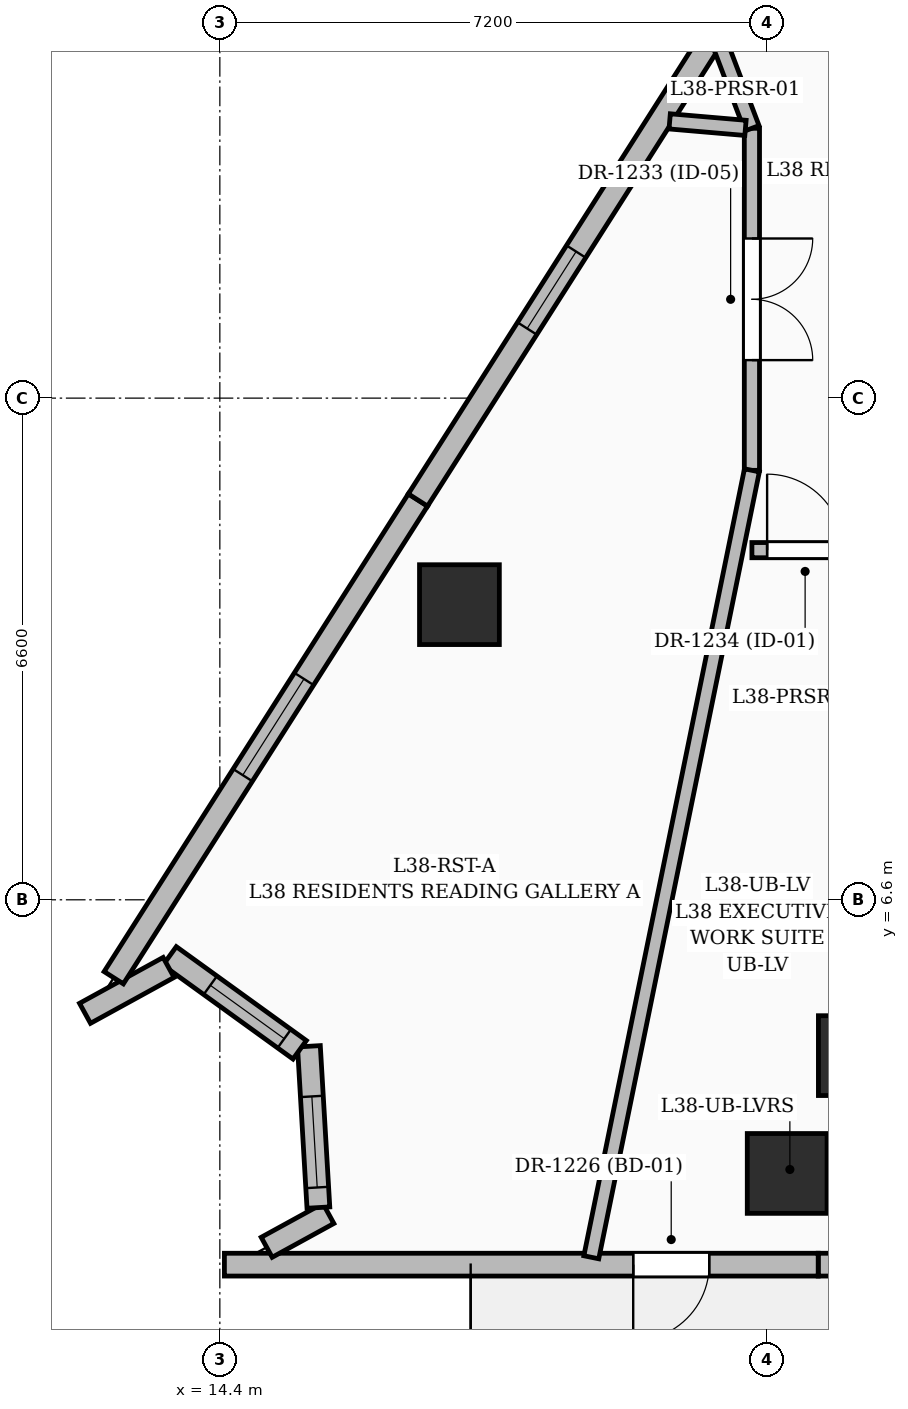
"""IFC4 building model, lengths in metres.
Left out: names, types, materials, properties, quantities, classifications, styles, units other than length and angle.
Written with IfcOpenShell. Run it as: python <this file> out.ifc"""

import sys

from ifc_helpers import new_model, si_unit, direction, frame, frame_2d, origin, origin_2d, place, context, subcontext, project, spatial, rectangle, extrude, element, fill, save


model = new_model("IFC4")
c1 = context("Model", 3, precision=1e-05, world=origin(), true_north=direction((0.0, 1.0)))
c2 = subcontext(c1, "Body", "Model", "MODEL_VIEW")
j1 = project(units=[si_unit("LENGTHUNIT", "METRE"), si_unit("PLANEANGLEUNIT", "RADIAN")], contexts=[c1])
p1 = place(None, origin())
s1 = spatial("IfcSite", under=j1, at=p1, CompositionType="ELEMENT")
p2 = place(p1, origin())
s2 = spatial("IfcBuilding", under=s1, at=p2, CompositionType="ELEMENT")
p3 = place(p2, frame((0.0, 0.0, 150.0)))
s3 = spatial("IfcBuildingStorey", under=s2, at=p3, CompositionType="ELEMENT", Elevation=150.0)
for number, where, z_axis, x_axis in (
    (1, (22.8, 4.55, 0.0), (0.0, 0.0, 1.0), (1.0, 0.0, 0.0)),
    (2, (21.864, 3.0, 0.0), (0.0, 0.0, 1.0), (1.0, 0.0, 0.0)),
    (3, (17.552, 10.483, 0.0), (0.0, 0.0, 1.0), (1.0, 0.0, 0.0)),
):
    element("IfcColumn", number, at=place(p3, frame(where, z_axis=z_axis, x_axis=x_axis)), inside=s3, PredefinedType="COLUMN", context=c2, shape_type="SweptSolid", body=[
        extrude(rectangle(XDim=1.05, YDim=1.05, at=origin_2d()), origin(), (0.0, 0.0, 1.0), 3.6),
    ])
p4 = place(p3, frame((30.084, 1.8, 0.0), z_axis=(0.0, 0.0, 1.0), x_axis=(-1.0, 0.0, 0.0)))
e4 = element("IfcWall", 4, at=p4, inside=s3, PredefinedType="SOLIDWALL", context=c2, shape_type="SweptSolid", body=[
    extrude(rectangle(XDim=7.812, YDim=0.3, at=frame_2d((3.906, 0.0))), origin(), (0.0, 0.0, 1.0), 3.35),
])
p5 = place(p4, frame((4.525, 0.0, 0.6)))
e5 = element("IfcOpeningElement", 5, at=p5, cuts=e4, PredefinedType="OPENING", context=c2, shape_type="SweptSolid", body=[
    extrude(rectangle(XDim=1.5, YDim=2.1, at=frame_2d((0.75, 1.05))), frame((0.0, 0.16, 0.0), z_axis=(0.0, -1.0, 0.0), x_axis=(1.0, 0.0, 0.0)), (0.0, 0.0, 1.0), 0.32),
])
p6 = place(p4, frame((1.025, 0.0, 0.6)))
e6 = element("IfcOpeningElement", 6, at=p6, cuts=e4, PredefinedType="OPENING", context=c2, shape_type="SweptSolid", body=[
    extrude(rectangle(XDim=1.5, YDim=2.1, at=frame_2d((0.75, 1.05))), frame((0.0, 0.16, 0.0), z_axis=(0.0, -1.0, 0.0), x_axis=(1.0, 0.0, 0.0)), (0.0, 0.0, 1.0), 0.32),
])
p7 = place(p3, frame((22.272, 1.8, 0.0), z_axis=(0.0, 0.0, 1.0), x_axis=(-1.0, 0.0, 0.0)))
e7 = element("IfcWall", 7, at=p7, inside=s3, PredefinedType="SOLIDWALL", context=c2, shape_type="SweptSolid", body=[
    extrude(rectangle(XDim=7.812, YDim=0.3, at=frame_2d((3.906, 0.0))), origin(), (0.0, 0.0, 1.0), 3.35),
])
p8 = place(p7, frame((1.434, 0.0, 0.0)))
e8 = element("IfcOpeningElement", 8, at=p8, cuts=e7, PredefinedType="OPENING", context=c2, shape_type="SweptSolid", body=[
    extrude(rectangle(XDim=1.0, YDim=2.2, at=frame_2d((0.5, 1.1))), frame((0.0, 0.16, 0.0), z_axis=(0.0, -1.0, 0.0), x_axis=(1.0, 0.0, 0.0)), (0.0, 0.0, 1.0), 0.32),
])
p9 = place(p3, frame((15.016, 2.028, 0.0), z_axis=(0.0, 0.0, 1.0), x_axis=(0.876794471231, 0.48086531921, 0.0)))
e9 = element("IfcWall", 9, at=p9, inside=s3, PredefinedType="SOLIDWALL", context=c2, shape_type="SweptSolid", body=[
    extrude(rectangle(XDim=0.926, YDim=0.3, at=frame_2d((0.463, 0.0))), origin(), (0.0, 0.0, 1.0), 3.35),
])
p10 = place(p3, frame((15.697, 2.551, 0.0), z_axis=(0.0, 0.0, 1.0), x_axis=(-0.058688358982, 0.99827635278, 0.0)))
e10 = element("IfcWall", 10, at=p10, inside=s3, PredefinedType="SOLIDWALL", context=c2, shape_type="SweptSolid", body=[
    extrude(rectangle(XDim=2.126, YDim=0.3, at=frame_2d((1.063, 0.0))), origin(), (0.0, 0.0, 1.0), 3.35),
])
p11 = place(p10, frame((0.265, 0.0, 0.8)))
e11 = element("IfcOpeningElement", 11, at=p11, cuts=e10, PredefinedType="OPENING", context=c2, shape_type="SweptSolid", body=[
    extrude(rectangle(XDim=1.2, YDim=1.8, at=frame_2d((0.6, 0.9))), frame((0.0, 0.16, 0.0), z_axis=(0.0, -1.0, 0.0), x_axis=(1.0, 0.0, 0.0)), (0.0, 0.0, 1.0), 0.32),
])
p12 = place(p3, frame((15.45, 4.627, 0.0), z_axis=(0.0, 0.0, 1.0), x_axis=(-0.810712787228, 0.585444084969, 0.0)))
e12 = element("IfcWall", 12, at=p12, inside=s3, PredefinedType="SOLIDWALL", context=c2, shape_type="SweptSolid", body=[
    extrude(rectangle(XDim=2.11, YDim=0.3, at=frame_2d((1.055, 0.0))), origin(), (0.0, 0.0, 1.0), 3.35),
])
p13 = place(p12, frame((0.25, 0.0, 0.8)))
e13 = element("IfcOpeningElement", 13, at=p13, cuts=e12, PredefinedType="OPENING", context=c2, shape_type="SweptSolid", body=[
    extrude(rectangle(XDim=1.2, YDim=1.8, at=frame_2d((0.6, 0.9))), frame((0.0, 0.16, 0.0), z_axis=(0.0, -1.0, 0.0), x_axis=(1.0, 0.0, 0.0)), (0.0, 0.0, 1.0), 0.32),
])
p14 = place(p3, frame((13.726, 5.71, 0.0), z_axis=(0.0, 0.0, 1.0), x_axis=(-0.876642942611, -0.481141508467, 0.0)))
e14 = element("IfcWall", 14, at=p14, inside=s3, PredefinedType="SOLIDWALL", context=c2, shape_type="SweptSolid", body=[
    extrude(rectangle(XDim=1.254, YDim=0.3, at=frame_2d((0.627, 0.0))), origin(), (0.0, 0.0, 1.0), 3.35),
])
p15 = place(p3, frame((13.004, 5.575, 0.0), z_axis=(0.0, 0.0, 1.0), x_axis=(0.5371108129, 0.843511692074, 0.0)))
e15 = element("IfcWall", 15, at=p15, inside=s3, PredefinedType="SOLIDWALL", context=c2, shape_type="SweptSolid", body=[
    extrude(rectangle(XDim=7.451, YDim=0.3, at=frame_2d((3.726, 0.0))), origin(), (0.0, 0.0, 1.0), 3.35),
])
p16 = place(p15, frame((3.16, 0.0, 0.6)))
e16 = element("IfcOpeningElement", 16, at=p16, cuts=e15, PredefinedType="OPENING", context=c2, shape_type="SweptSolid", body=[
    extrude(rectangle(XDim=1.5, YDim=2.1, at=frame_2d((0.75, 1.05))), frame((0.0, 0.16, 0.0), z_axis=(0.0, -1.0, 0.0), x_axis=(1.0, 0.0, 0.0)), (0.0, 0.0, 1.0), 0.32),
])
p17 = place(p3, frame((17.006, 11.86, 0.0), z_axis=(0.0, 0.0, 1.0), x_axis=(0.537098524817, 0.843519516454, 0.0)))
e17 = element("IfcWall", 17, at=p17, inside=s3, PredefinedType="SOLIDWALL", context=c2, shape_type="SweptSolid", body=[
    extrude(rectangle(XDim=7.791, YDim=0.3, at=frame_2d((3.895, 0.0))), origin(), (0.0, 0.0, 1.0), 3.35),
])
p18 = place(p17, frame((2.675, 0.0, 0.8)))
e18 = element("IfcOpeningElement", 18, at=p18, cuts=e17, PredefinedType="OPENING", context=c2, shape_type="SweptSolid", body=[
    extrude(rectangle(XDim=1.2, YDim=1.8, at=frame_2d((0.6, 0.9))), frame((0.0, 0.16, 0.0), z_axis=(0.0, -1.0, 0.0), x_axis=(1.0, 0.0, 0.0)), (0.0, 0.0, 1.0), 0.32),
])
p19 = place(p3, frame((21.4, 16.75, 0.0), z_axis=(0.0, 0.0, 1.0), x_axis=(0.0, -1.0, 0.0)))
e19 = element("IfcWall", 19, at=p19, inside=s3, PredefinedType="PARTITIONING", context=c2, shape_type="SweptSolid", body=[
    extrude(rectangle(XDim=4.5, YDim=0.2, at=frame_2d((2.25, 0.0))), origin(), (0.0, 0.0, 1.0), 2.57),
])
p20 = place(p19, frame((1.45, 0.0, 0.0)))
e20 = element("IfcOpeningElement", 20, at=p20, cuts=e19, PredefinedType="OPENING", context=c2, shape_type="SweptSolid", body=[
    extrude(rectangle(XDim=1.6, YDim=2.3, at=frame_2d((0.8, 1.15))), frame((0.0, 0.11, 0.0), z_axis=(0.0, -1.0, 0.0), x_axis=(1.0, 0.0, 0.0)), (0.0, 0.0, 1.0), 0.22),
])
p21 = place(p3, frame((21.4, 11.2, 0.0), z_axis=(0.0, 0.0, 1.0), x_axis=(1.0, 0.0, 0.0)))
e21 = element("IfcWall", 21, at=p21, inside=s3, PredefinedType="PARTITIONING", context=c2, shape_type="SweptSolid", body=[
    extrude(rectangle(XDim=1.4, YDim=0.2, at=frame_2d((0.7, 0.0))), origin(), (0.0, 0.0, 1.0), 3.35),
])
p22 = place(p21, frame((0.2, 0.0, 0.0)))
e22 = element("IfcOpeningElement", 22, at=p22, cuts=e21, PredefinedType="OPENING", context=c2, shape_type="SweptSolid", body=[
    extrude(rectangle(XDim=1.0, YDim=2.2, at=frame_2d((0.5, 1.1))), frame((0.0, 0.11, 0.0), z_axis=(0.0, -1.0, 0.0), x_axis=(1.0, 0.0, 0.0)), (0.0, 0.0, 1.0), 0.22),
])
p23 = place(p3, frame((20.981, 17.857, 0.0), z_axis=(0.0, 0.0, 1.0), x_axis=(0.353970125301, -0.935256729671, 0.0)))
e23 = element("IfcWall", 23, at=p23, inside=s3, PredefinedType="PARTITIONING", context=c2, shape_type="SweptSolid", body=[
    extrude(rectangle(XDim=1.184, YDim=0.2, at=frame_2d((0.592, 0.0))), origin(), (0.0, 0.0, 1.0), 2.57),
])
p24 = place(p3, frame((19.287, 1.897, 0.0), z_axis=(0.0, 0.0, 1.0), x_axis=(0.19995367442, 0.979805352142, 0.0)))
e24 = element("IfcWall", 24, at=p24, inside=s3, PredefinedType="PARTITIONING", context=c2, shape_type="SweptSolid", body=[
    extrude(rectangle(XDim=10.566, YDim=0.2, at=frame_2d((5.283, 0.0))), origin(), (0.0, 0.0, 1.0), 1.12),
])
p25 = place(p3, frame((21.315, 16.755, 0.0), z_axis=(0.0, 0.0, 1.0), x_axis=(-0.996327050831, 0.085629479638, 0.0)))
e25 = element("IfcWall", 25, at=p25, inside=s3, PredefinedType="PARTITIONING", context=c2, shape_type="SweptSolid", body=[
    extrude(rectangle(XDim=1.001, YDim=0.2, at=frame_2d((0.5, 0.0))), origin(), (0.0, 0.0, 1.0), 2.57),
])
p26 = place(p8, origin())
e26 = element("IfcDoor", 26, at=p26, inside=s3, OperationType="SINGLE_SWING_RIGHT", PredefinedType="DOOR", context=c2, shape_type="SweptSolid", body=[
    extrude(rectangle(XDim=1.0, YDim=2.2, at=frame_2d((0.5, 1.1))), frame((0.0, 0.025, 0.0), z_axis=(0.0, -1.0, 0.0), x_axis=(1.0, 0.0, 0.0)), (0.0, 0.0, 1.0), 0.05),
])
fill(e8, e26)
p27 = place(p11, origin())
e27 = element("IfcWindow", 27, at=p27, inside=s3, PartitioningType="SINGLE_PANEL", PredefinedType="WINDOW", context=c2, shape_type="SweptSolid", body=[
    extrude(rectangle(XDim=1.2, YDim=1.8, at=frame_2d((0.6, 0.9))), frame((0.0, 0.03, 0.0), z_axis=(0.0, -1.0, 0.0), x_axis=(1.0, 0.0, 0.0)), (0.0, 0.0, 1.0), 0.06),
])
fill(e11, e27)
p28 = place(p13, origin())
e28 = element("IfcWindow", 28, at=p28, inside=s3, PartitioningType="SINGLE_PANEL", PredefinedType="WINDOW", context=c2, shape_type="SweptSolid", body=[
    extrude(rectangle(XDim=1.2, YDim=1.8, at=frame_2d((0.6, 0.9))), frame((0.0, 0.03, 0.0), z_axis=(0.0, -1.0, 0.0), x_axis=(1.0, 0.0, 0.0)), (0.0, 0.0, 1.0), 0.06),
])
fill(e13, e28)
p29 = place(p16, origin())
e29 = element("IfcWindow", 29, at=p29, inside=s3, PartitioningType="SINGLE_PANEL", PredefinedType="WINDOW", context=c2, shape_type="SweptSolid", body=[
    extrude(rectangle(XDim=1.5, YDim=2.1, at=frame_2d((0.75, 1.05))), frame((0.0, 0.03, 0.0), z_axis=(0.0, -1.0, 0.0), x_axis=(1.0, 0.0, 0.0)), (0.0, 0.0, 1.0), 0.06),
])
fill(e16, e29)
p30 = place(p18, origin())
e30 = element("IfcWindow", 30, at=p30, inside=s3, PartitioningType="SINGLE_PANEL", PredefinedType="WINDOW", context=c2, shape_type="SweptSolid", body=[
    extrude(rectangle(XDim=1.2, YDim=1.8, at=frame_2d((0.6, 0.9))), frame((0.0, 0.03, 0.0), z_axis=(0.0, -1.0, 0.0), x_axis=(1.0, 0.0, 0.0)), (0.0, 0.0, 1.0), 0.06),
])
fill(e18, e30)
p31 = place(p20, origin())
e31 = element("IfcDoor", 31, at=p31, inside=s3, OperationType="DOUBLE_DOOR_SINGLE_SWING", PredefinedType="DOOR", context=c2, shape_type="SweptSolid", body=[
    extrude(rectangle(XDim=1.6, YDim=2.3, at=frame_2d((0.8, 1.15))), frame((0.0, 0.025, 0.0), z_axis=(0.0, -1.0, 0.0), x_axis=(1.0, 0.0, 0.0)), (0.0, 0.0, 1.0), 0.05),
])
fill(e20, e31)
p32 = place(p22, origin())
e32 = element("IfcDoor", 32, at=p32, inside=s3, OperationType="SINGLE_SWING_LEFT", PredefinedType="DOOR", context=c2, shape_type="SweptSolid", body=[
    extrude(rectangle(XDim=1.0, YDim=2.2, at=frame_2d((0.5, 1.1))), frame((0.0, 0.025, 0.0), z_axis=(0.0, -1.0, 0.0), x_axis=(1.0, 0.0, 0.0)), (0.0, 0.0, 1.0), 0.05),
])
fill(e22, e32)
save(model, sys.argv[1])
